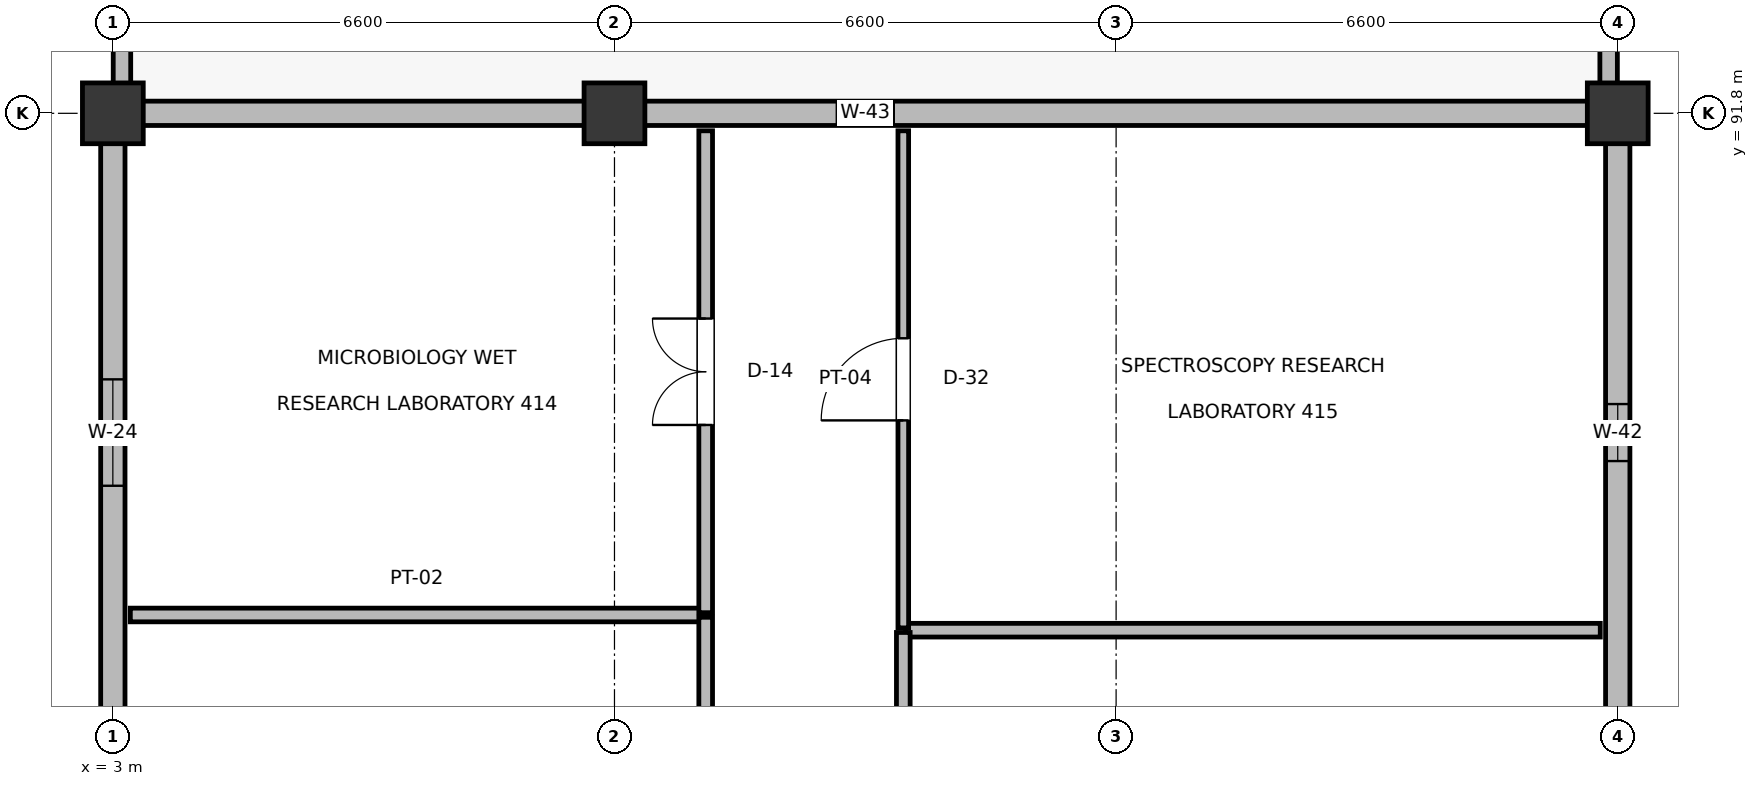
"""IFC4 building model, lengths in metres.
Left out: names, types, materials, properties, quantities, classifications, styles, units other than length and angle.
Written with IfcOpenShell. Run it as: python <this file> out.ifc"""

import sys

from ifc_helpers import new_model, si_unit, direction, frame, frame_2d, origin, origin_2d, place, context, subcontext, project, spatial, rectangle, extrude, element, fill, save


model = new_model("IFC4")
c1 = context("Model", 3, precision=1e-05, world=origin(), true_north=direction((0.0, 1.0)))
c2 = subcontext(c1, "Body", "Model", "MODEL_VIEW")
j1 = project(units=[si_unit("LENGTHUNIT", "METRE"), si_unit("PLANEANGLEUNIT", "RADIAN")], contexts=[c1])
p1 = place(None, origin())
s1 = spatial("IfcSite", under=j1, at=p1, CompositionType="ELEMENT")
p2 = place(p1, origin())
s2 = spatial("IfcBuilding", under=s1, at=p2, CompositionType="ELEMENT")
p3 = place(p2, frame((0.0, 0.0, 19.5)))
s3 = spatial("IfcBuildingStorey", under=s2, at=p3, CompositionType="ELEMENT", Elevation=19.5)
for number, where, z_axis, x_axis in (
    (1, (3.0, 91.8, 0.0), (0.0, 0.0, 1.0), (1.0, 0.0, 0.0)),
    (2, (9.6, 91.8, 0.0), (0.0, 0.0, 1.0), (1.0, 0.0, 0.0)),
    (3, (22.8, 91.8, 0.0), (0.0, 0.0, 1.0), (1.0, 0.0, 0.0)),
):
    element("IfcColumn", number, at=place(p3, frame(where, z_axis=z_axis, x_axis=x_axis)), inside=s3, PredefinedType="COLUMN", context=c2, shape_type="SweptSolid", body=[
        extrude(rectangle(XDim=0.8, YDim=0.8, at=origin_2d()), origin(), (0.0, 0.0, 1.0), 4.5),
    ])
p4 = place(p3, frame((3.0, 83.785, 0.0), z_axis=(0.0, 0.0, 1.0), x_axis=(0.0, 1.0, 0.0)))
e4 = element("IfcWall", 4, at=p4, inside=s3, PredefinedType="SOLIDWALL", context=c2, shape_type="SweptSolid", body=[
    extrude(rectangle(XDim=7.63, YDim=0.32, at=frame_2d((3.815, 0.0))), origin(), (0.0, 0.0, 1.0), 3.545),
])
p5 = place(p4, frame((3.115, 0.0, 0.9)))
e5 = element("IfcOpeningElement", 5, at=p5, cuts=e4, PredefinedType="OPENING", context=c2, shape_type="SweptSolid", body=[
    extrude(rectangle(XDim=1.4, YDim=1.95, at=frame_2d((0.7, 0.975))), frame((0.0, 0.17, 0.0), z_axis=(0.0, -1.0, 0.0), x_axis=(1.0, 0.0, 0.0)), (0.0, 0.0, 1.0), 0.34),
])
p6 = place(p3, frame((22.8, 83.785, 0.0), z_axis=(0.0, 0.0, 1.0), x_axis=(0.0, 1.0, 0.0)))
e6 = element("IfcWall", 6, at=p6, inside=s3, PredefinedType="SOLIDWALL", context=c2, shape_type="SweptSolid", body=[
    extrude(rectangle(XDim=7.63, YDim=0.32, at=frame_2d((3.815, 0.0))), origin(), (0.0, 0.0, 1.0), 3.595),
])
p7 = place(p6, frame((3.44, 0.0, 0.9)))
e7 = element("IfcOpeningElement", 7, at=p7, cuts=e6, PredefinedType="OPENING", context=c2, shape_type="SweptSolid", body=[
    extrude(rectangle(XDim=0.75, YDim=1.35, at=frame_2d((0.375, 0.675))), frame((0.0, 0.17, 0.0), z_axis=(0.0, -1.0, 0.0), x_axis=(1.0, 0.0, 0.0)), (0.0, 0.0, 1.0), 0.34),
])
p8 = place(p3, frame((3.385, 91.8, 0.0), z_axis=(0.0, 0.0, 1.0), x_axis=(1.0, 0.0, 0.0)))
e8 = element("IfcWall", 8, at=p8, inside=s3, PredefinedType="SOLIDWALL", context=c2, shape_type="SweptSolid", body=[
    extrude(rectangle(XDim=19.03, YDim=0.32, at=frame_2d((9.515, 0.0))), origin(), (0.0, 0.0, 1.0), 3.265),
])
p9 = place(p8, frame((9.14, 0.0, 0.95)))
e9 = element("IfcOpeningElement", 9, at=p9, cuts=e8, PredefinedType="OPENING", context=c2, shape_type="SweptSolid", body=[
    extrude(rectangle(XDim=0.75, YDim=1.55, at=frame_2d((0.375, 0.775))), frame((0.0, 0.17, 0.0), z_axis=(0.0, -1.0, 0.0), x_axis=(1.0, 0.0, 0.0)), (0.0, 0.0, 1.0), 0.34),
])
for number, where, z_axis, x_axis in (
    (10, (3.12, 92.15, 0.0), (0.0, 0.0, 1.0), (0.0, 1.0, 0.0)),
    (11, (22.68, 92.15, 0.0), (0.0, 0.0, 1.0), (0.0, 1.0, 0.0)),
):
    element("IfcWall", number, at=place(p3, frame(where, z_axis=z_axis, x_axis=x_axis)), inside=s3, PredefinedType="PARAPET", context=c2, shape_type="SweptSolid", body=[
        extrude(rectangle(XDim=24.5, YDim=0.23, at=frame_2d((12.25, 0.0))), origin(), (0.0, 0.0, 1.0), 1.05),
    ])
p10 = place(p3, frame((3.23, 85.2, 0.0), z_axis=(0.0, 0.0, 1.0), x_axis=(1.0, 0.0, 0.0)))
e12 = element("IfcWall", 12, at=p10, inside=s3, PredefinedType="PARTITIONING", context=c2, shape_type="SweptSolid", body=[
    extrude(rectangle(XDim=7.54, YDim=0.18, at=frame_2d((3.77, 0.0))), origin(), (0.0, 0.0, 1.0), 3.545),
])
p11 = place(p3, frame((10.8, 56.43, 0.0), z_axis=(0.0, 0.0, 1.0), x_axis=(0.0, 1.0, 0.0)))
e13 = element("IfcWall", 13, at=p11, inside=s3, PredefinedType="PARTITIONING", context=c2, shape_type="SweptSolid", body=[
    extrude(rectangle(XDim=28.74, YDim=0.18, at=frame_2d((14.37, 0.0))), origin(), (0.0, 0.0, 1.0), 3.255),
])
p12 = place(p11, frame((13.67, 0.0, 0.0)))
e14 = element("IfcOpeningElement", 14, at=p12, cuts=e13, PredefinedType="OPENING", context=c2, shape_type="SweptSolid", body=[
    extrude(rectangle(XDim=1.4, YDim=2.2, at=frame_2d((0.7, 1.1))), frame((0.0, 0.1, 0.0), z_axis=(0.0, -1.0, 0.0), x_axis=(1.0, 0.0, 0.0)), (0.0, 0.0, 1.0), 0.2),
])
p13 = place(p3, frame((13.43, 85.0, 0.0), z_axis=(0.0, 0.0, 1.0), x_axis=(1.0, 0.0, 0.0)))
e15 = element("IfcWall", 15, at=p13, inside=s3, PredefinedType="PARTITIONING", context=c2, shape_type="SweptSolid", body=[
    extrude(rectangle(XDim=9.14, YDim=0.18, at=frame_2d((4.57, 0.0))), origin(), (0.0, 0.0, 1.0), 3.595),
])
p14 = place(p3, frame((13.4, 73.853, 0.0), z_axis=(0.0, 0.0, 1.0), x_axis=(0.0, 1.0, 0.0)))
e16 = element("IfcWall", 16, at=p14, inside=s3, PredefinedType="PARTITIONING", context=c2, shape_type="SweptSolid", body=[
    extrude(rectangle(XDim=11.117, YDim=0.18, at=frame_2d((5.558, 0.0))), origin(), (0.0, 0.0, 1.0), 3.255),
])
p15 = place(p14, frame((4.858, 0.0, 0.0)))
e17 = element("IfcOpeningElement", 17, at=p15, cuts=e16, PredefinedType="OPENING", context=c2, shape_type="SweptSolid", body=[
    extrude(rectangle(XDim=1.4, YDim=2.2, at=frame_2d((0.7, 1.1))), frame((0.0, 0.1, 0.0), z_axis=(0.0, -1.0, 0.0), x_axis=(1.0, 0.0, 0.0)), (0.0, 0.0, 1.0), 0.2),
])
p16 = place(p3, frame((10.8, 85.23, 0.0), z_axis=(0.0, 0.0, 1.0), x_axis=(0.0, 1.0, 0.0)))
e18 = element("IfcWall", 18, at=p16, inside=s3, PredefinedType="PARTITIONING", context=c2, shape_type="SweptSolid", body=[
    extrude(rectangle(XDim=6.34, YDim=0.18, at=frame_2d((3.17, 0.0))), origin(), (0.0, 0.0, 1.0), 3.265),
])
p17 = place(p16, frame((2.47, 0.0, 0.0)))
e19 = element("IfcOpeningElement", 19, at=p17, cuts=e18, PredefinedType="OPENING", context=c2, shape_type="SweptSolid", body=[
    extrude(rectangle(XDim=1.4, YDim=2.2, at=frame_2d((0.7, 1.1))), frame((0.0, 0.1, 0.0), z_axis=(0.0, -1.0, 0.0), x_axis=(1.0, 0.0, 0.0)), (0.0, 0.0, 1.0), 0.2),
])
p18 = place(p3, frame((13.4, 85.03, 0.0), z_axis=(0.0, 0.0, 1.0), x_axis=(0.0, 1.0, 0.0)))
e20 = element("IfcWall", 20, at=p18, inside=s3, PredefinedType="PARTITIONING", context=c2, shape_type="SweptSolid", body=[
    extrude(rectangle(XDim=6.54, YDim=0.14, at=frame_2d((3.27, 0.0))), origin(), (0.0, 0.0, 1.0), 3.265),
])
p19 = place(p18, frame((2.73, 0.0, 0.0)))
e21 = element("IfcOpeningElement", 21, at=p19, cuts=e20, PredefinedType="OPENING", context=c2, shape_type="SweptSolid", body=[
    extrude(rectangle(XDim=1.08, YDim=2.15, at=frame_2d((0.54, 1.075))), frame((0.0, 0.08, 0.0), z_axis=(0.0, -1.0, 0.0), x_axis=(1.0, 0.0, 0.0)), (0.0, 0.0, 1.0), 0.16),
])
p20 = place(p5, origin())
e22 = element("IfcWindow", 22, at=p20, inside=s3, PartitioningType="DOUBLE_PANEL_VERTICAL", PredefinedType="WINDOW", context=c2, shape_type="SweptSolid", body=[
    extrude(rectangle(XDim=1.4, YDim=1.95, at=frame_2d((0.7, 0.975))), frame((0.0, 0.03, 0.0), z_axis=(0.0, -1.0, 0.0), x_axis=(1.0, 0.0, 0.0)), (0.0, 0.0, 1.0), 0.06),
])
fill(e5, e22)
p21 = place(p7, frame((0.75, 0.0, 0.0), z_axis=(0.0, 0.0, 1.0), x_axis=(-1.0, 0.0, 0.0)))
e23 = element("IfcWindow", 23, at=p21, inside=s3, PartitioningType="DOUBLE_PANEL_VERTICAL", PredefinedType="WINDOW", context=c2, shape_type="SweptSolid", body=[
    extrude(rectangle(XDim=0.75, YDim=1.35, at=frame_2d((0.375, 0.675))), frame((0.0, 0.03, 0.0), z_axis=(0.0, -1.0, 0.0), x_axis=(1.0, 0.0, 0.0)), (0.0, 0.0, 1.0), 0.06),
])
fill(e7, e23)
p22 = place(p9, origin())
e24 = element("IfcWindow", 24, at=p22, inside=s3, PartitioningType="DOUBLE_PANEL_VERTICAL", PredefinedType="WINDOW", context=c2, shape_type="SweptSolid", body=[
    extrude(rectangle(XDim=0.75, YDim=1.55, at=frame_2d((0.375, 0.775))), frame((0.0, 0.03, 0.0), z_axis=(0.0, -1.0, 0.0), x_axis=(1.0, 0.0, 0.0)), (0.0, 0.0, 1.0), 0.06),
])
fill(e9, e24)
p23 = place(p17, origin())
e25 = element("IfcDoor", 25, at=p23, inside=s3, OperationType="DOUBLE_DOOR_SINGLE_SWING", PredefinedType="DOOR", context=c2, shape_type="SweptSolid", body=[
    extrude(rectangle(XDim=1.4, YDim=2.2, at=frame_2d((0.7, 1.1))), frame((0.0, 0.025, 0.0), z_axis=(0.0, -1.0, 0.0), x_axis=(1.0, 0.0, 0.0)), (0.0, 0.0, 1.0), 0.05),
])
fill(e19, e25)
p24 = place(p19, origin())
e26 = element("IfcDoor", 26, at=p24, inside=s3, OperationType="SINGLE_SWING_LEFT", PredefinedType="DOOR", context=c2, shape_type="SweptSolid", body=[
    extrude(rectangle(XDim=1.08, YDim=2.15, at=frame_2d((0.54, 1.075))), frame((0.0, 0.025, 0.0), z_axis=(0.0, -1.0, 0.0), x_axis=(1.0, 0.0, 0.0)), (0.0, 0.0, 1.0), 0.05),
])
fill(e21, e26)
save(model, sys.argv[1])
